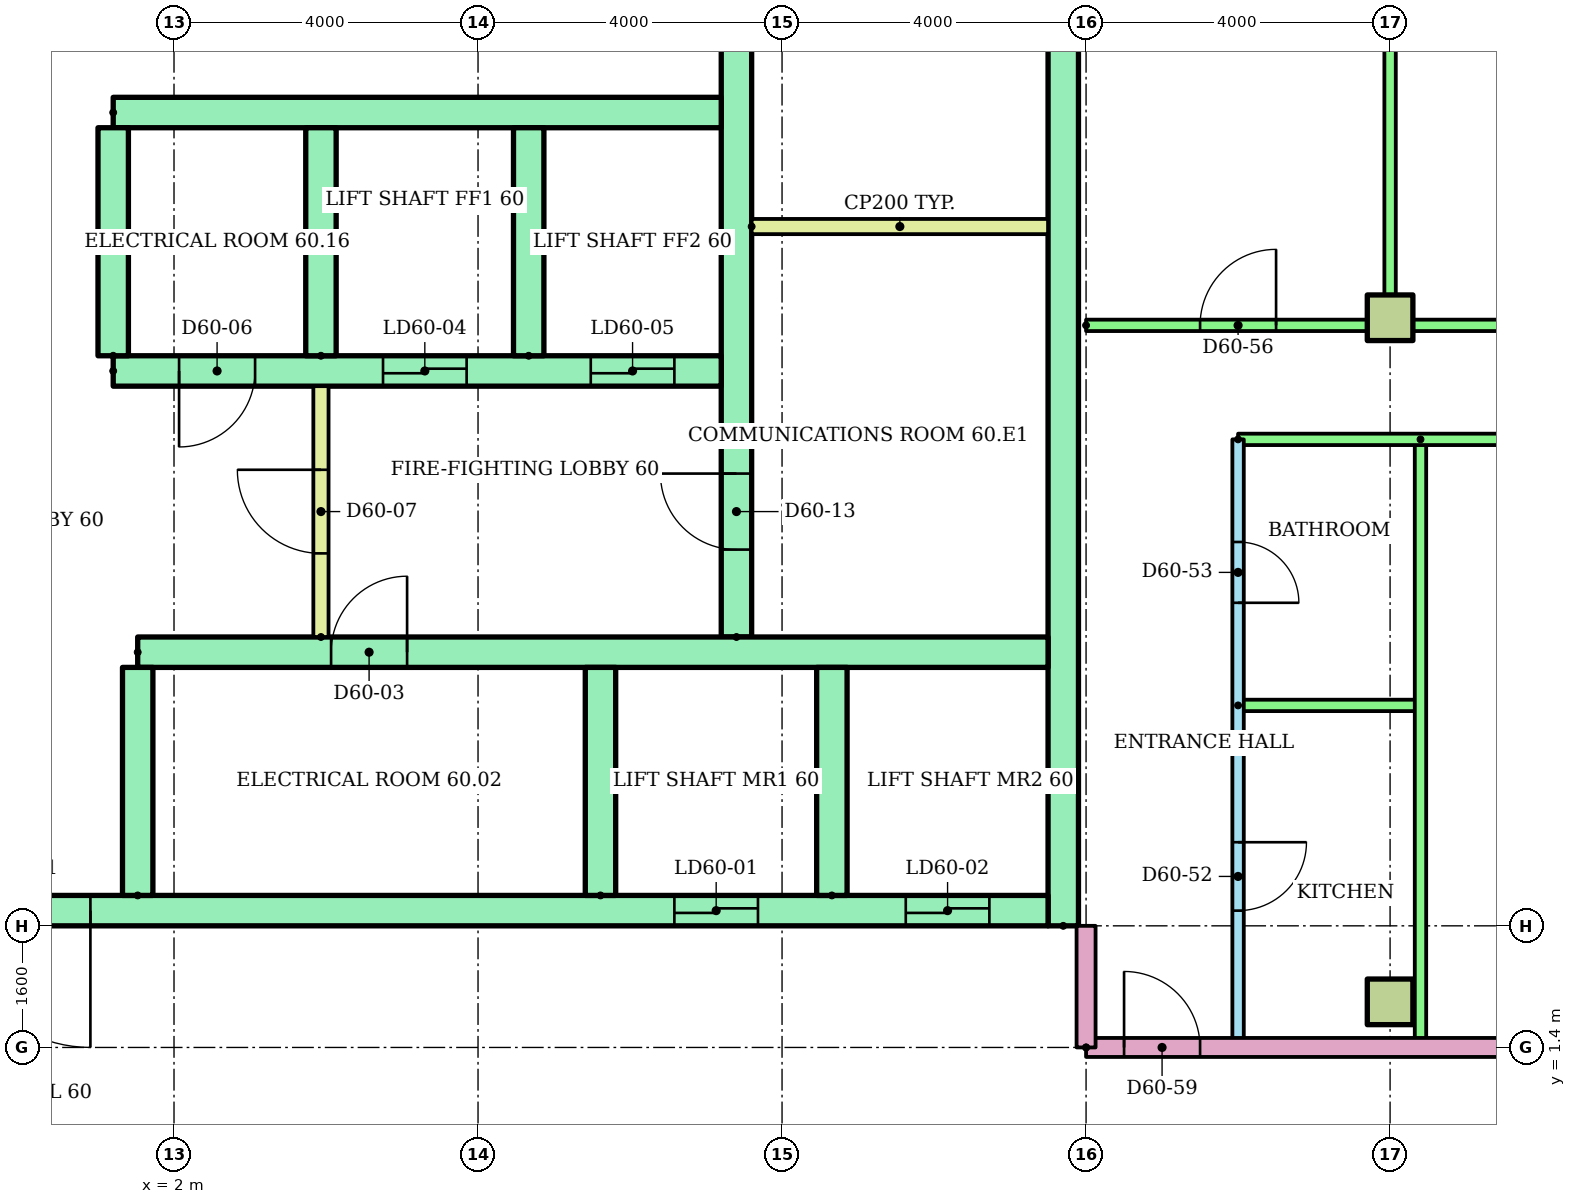
"""IFC4 building model, lengths in metres.
Left out: names, types, materials, properties, quantities, classifications, styles, units other than length and angle.
Written with IfcOpenShell. Run it as: python <this file> out.ifc"""

import sys

from ifc_helpers import new_model, si_unit, direction, frame, frame_2d, origin, origin_2d, place, context, subcontext, project, spatial, rectangle, extrude, element, fill, save


model = new_model("IFC4")
c1 = context("Model", 3, precision=1e-05, world=origin(), true_north=direction((0.0, 1.0)))
c2 = subcontext(c1, "Body", "Model", "MODEL_VIEW")
j1 = project(units=[si_unit("LENGTHUNIT", "METRE"), si_unit("PLANEANGLEUNIT", "RADIAN")], contexts=[c1])
p1 = place(None, origin())
s1 = spatial("IfcSite", under=j1, at=p1, CompositionType="ELEMENT")
p2 = place(p1, origin())
s2 = spatial("IfcBuilding", under=s1, at=p2, CompositionType="ELEMENT")
p3 = place(p2, frame((0.0, 0.0, 230.0)))
s3 = spatial("IfcBuildingStorey", under=s2, at=p3, CompositionType="ELEMENT", Elevation=230.0)
for number, where in (
    (1, (18.0, 2.0, 0.0)),
    (2, (18.0, 11.0, 0.0)),
):
    element("IfcColumn", number, at=place(p3, frame(where)), inside=s3, PredefinedType="COLUMN", context=c2, shape_type="SweptSolid", body=[
        extrude(rectangle(XDim=0.6, YDim=0.6, at=origin_2d()), origin(), (0.0, 0.0, 1.0), 3.2),
    ])
p4 = place(p3, frame((13.7, 3.0, 0.0), z_axis=(0.0, 0.0, 1.0), x_axis=(0.0, 1.0, 0.0)))
e3 = element("IfcWall", 3, at=p4, inside=s3, PredefinedType="SHEAR", context=c2, shape_type="SweptSolid", body=[
    extrude(rectangle(XDim=17.0, YDim=0.4, at=frame_2d((8.5, 0.0))), origin(), (0.0, 0.0, 1.0), 2.92),
])
p5 = place(p3, frame((9.4, 6.8, 0.0), z_axis=(0.0, 0.0, 1.0), x_axis=(0.0, 1.0, 0.0)))
e4 = element("IfcWall", 4, at=p5, inside=s3, PredefinedType="SHEAR", context=c2, shape_type="SweptSolid", body=[
    extrude(rectangle(XDim=12.7, YDim=0.4, at=frame_2d((6.35, 0.0))), origin(), (0.0, 0.0, 1.0), 2.92),
])
p6 = place(p5, frame((1.15, 0.0, 0.0)))
e5 = element("IfcOpeningElement", 5, at=p6, cuts=e4, PredefinedType="OPENING", context=c2, shape_type="SweptSolid", body=[
    extrude(rectangle(XDim=1.0, YDim=2.1, at=frame_2d((0.5, 1.05))), frame((0.0, 0.21, 0.0), z_axis=(0.0, -1.0, 0.0), x_axis=(1.0, 0.0, 0.0)), (0.0, 0.0, 1.0), 0.42),
])
p7 = place(p5, frame((7.925, 0.0, 0.0)))
e6 = element("IfcOpeningElement", 6, at=p7, cuts=e4, PredefinedType="OPENING", context=c2, shape_type="SweptSolid", body=[
    extrude(rectangle(XDim=1.0, YDim=2.1, at=frame_2d((0.5, 1.05))), frame((0.0, 0.21, 0.0), z_axis=(0.0, -1.0, 0.0), x_axis=(1.0, 0.0, 0.0)), (0.0, 0.0, 1.0), 0.42),
])
p8 = place(p3, frame((-13.5, 3.2, 0.0)))
e7 = element("IfcWall", 7, at=p8, inside=s3, PredefinedType="SHEAR", context=c2, shape_type="SweptSolid", body=[
    extrude(rectangle(XDim=27.0, YDim=0.4, at=frame_2d((13.5, 0.0))), origin(), (0.0, 0.0, 1.0), 2.92),
])
p9 = place(p8, frame((22.083, 0.0, 0.0)))
e8 = element("IfcOpeningElement", 8, at=p9, cuts=e7, PredefinedType="OPENING", context=c2, shape_type="SweptSolid", body=[
    extrude(rectangle(XDim=1.1, YDim=2.1, at=frame_2d((0.55, 1.05))), frame((0.0, 0.21, 0.0), z_axis=(0.0, -1.0, 0.0), x_axis=(1.0, 0.0, 0.0)), (0.0, 0.0, 1.0), 0.42),
])
p10 = place(p8, frame((25.128, 0.0, 0.0)))
e9 = element("IfcOpeningElement", 9, at=p10, cuts=e7, PredefinedType="OPENING", context=c2, shape_type="SweptSolid", body=[
    extrude(rectangle(XDim=1.1, YDim=2.1, at=frame_2d((0.55, 1.05))), frame((0.0, 0.21, 0.0), z_axis=(0.0, -1.0, 0.0), x_axis=(1.0, 0.0, 0.0)), (0.0, 0.0, 1.0), 0.42),
])
p11 = place(p8, frame((12.6, 0.0, 0.0)))
e10 = element("IfcOpeningElement", 10, at=p11, cuts=e7, PredefinedType="OPENING", context=c2, shape_type="SweptSolid", body=[
    extrude(rectangle(XDim=1.8, YDim=2.1, at=frame_2d((0.9, 1.05))), frame((0.0, 0.21, 0.0), z_axis=(0.0, -1.0, 0.0), x_axis=(1.0, 0.0, 0.0)), (0.0, 0.0, 1.0), 0.42),
])
p12 = place(p3, frame((1.522, 6.6, 0.0)))
e11 = element("IfcWall", 11, at=p12, inside=s3, PredefinedType="SHEAR", context=c2, shape_type="SweptSolid", body=[
    extrude(rectangle(XDim=11.978, YDim=0.4, at=frame_2d((5.989, 0.0))), origin(), (0.0, 0.0, 1.0), 2.92),
])
p13 = place(p12, frame((2.544, 0.0, 0.0)))
e12 = element("IfcOpeningElement", 12, at=p13, cuts=e11, PredefinedType="OPENING", context=c2, shape_type="SweptSolid", body=[
    extrude(rectangle(XDim=1.0, YDim=2.1, at=frame_2d((0.5, 1.05))), frame((0.0, 0.21, 0.0), z_axis=(0.0, -1.0, 0.0), x_axis=(1.0, 0.0, 0.0)), (0.0, 0.0, 1.0), 0.42),
])
for number, where, z_axis, x_axis in (
    (13, (1.522, 3.4, 0.0), (0.0, 0.0, 1.0), (0.0, 1.0, 0.0)),
    (14, (7.611, 3.4, 0.0), (0.0, 0.0, 1.0), (0.0, 1.0, 0.0)),
    (15, (10.656, 3.4, 0.0), (0.0, 0.0, 1.0), (0.0, 1.0, 0.0)),
):
    element("IfcWall", number, at=place(p3, frame(where, z_axis=z_axis, x_axis=x_axis)), inside=s3, PredefinedType="SHEAR", context=c2, shape_type="SweptSolid", body=[
        extrude(rectangle(XDim=3.0, YDim=0.4, at=frame_2d((1.5, 0.0))), origin(), (0.0, 0.0, 1.0), 2.92),
    ])
p14 = place(p3, frame((1.2, 10.3, 0.0)))
e16 = element("IfcWall", 16, at=p14, inside=s3, PredefinedType="SHEAR", context=c2, shape_type="SweptSolid", body=[
    extrude(rectangle(XDim=8.0, YDim=0.4, at=frame_2d((4.0, 0.0))), origin(), (0.0, 0.0, 1.0), 2.92),
])
p15 = place(p14, frame((3.55, 0.0, 0.0)))
e17 = element("IfcOpeningElement", 17, at=p15, cuts=e16, PredefinedType="OPENING", context=c2, shape_type="SweptSolid", body=[
    extrude(rectangle(XDim=1.1, YDim=2.1, at=frame_2d((0.55, 1.05))), frame((0.0, 0.21, 0.0), z_axis=(0.0, -1.0, 0.0), x_axis=(1.0, 0.0, 0.0)), (0.0, 0.0, 1.0), 0.42),
])
p16 = place(p14, frame((6.283, 0.0, 0.0)))
e18 = element("IfcOpeningElement", 18, at=p16, cuts=e16, PredefinedType="OPENING", context=c2, shape_type="SweptSolid", body=[
    extrude(rectangle(XDim=1.1, YDim=2.1, at=frame_2d((0.55, 1.05))), frame((0.0, 0.21, 0.0), z_axis=(0.0, -1.0, 0.0), x_axis=(1.0, 0.0, 0.0)), (0.0, 0.0, 1.0), 0.42),
])
p17 = place(p14, frame((0.867, 0.0, 0.0)))
e19 = element("IfcOpeningElement", 19, at=p17, cuts=e16, PredefinedType="OPENING", context=c2, shape_type="SweptSolid", body=[
    extrude(rectangle(XDim=1.0, YDim=2.1, at=frame_2d((0.5, 1.05))), frame((0.0, 0.21, 0.0), z_axis=(0.0, -1.0, 0.0), x_axis=(1.0, 0.0, 0.0)), (0.0, 0.0, 1.0), 0.42),
])
p18 = place(p3, frame((1.2, 13.7, 0.0)))
e20 = element("IfcWall", 20, at=p18, inside=s3, PredefinedType="SHEAR", context=c2, shape_type="SweptSolid", body=[
    extrude(rectangle(XDim=8.0, YDim=0.4, at=frame_2d((4.0, 0.0))), origin(), (0.0, 0.0, 1.0), 2.92),
])
for number, where, z_axis, x_axis in (
    (21, (1.2, 10.5, 0.0), (0.0, 0.0, 1.0), (0.0, 1.0, 0.0)),
    (22, (3.933, 10.5, 0.0), (0.0, 0.0, 1.0), (0.0, 1.0, 0.0)),
    (23, (6.667, 10.5, 0.0), (0.0, 0.0, 1.0), (0.0, 1.0, 0.0)),
):
    element("IfcWall", number, at=place(p3, frame(where, z_axis=z_axis, x_axis=x_axis)), inside=s3, PredefinedType="SHEAR", context=c2, shape_type="SweptSolid", body=[
        extrude(rectangle(XDim=3.0, YDim=0.4, at=frame_2d((1.5, 0.0))), origin(), (0.0, 0.0, 1.0), 2.92),
    ])
p19 = place(p3, frame((3.933, 6.8, 0.0), z_axis=(0.0, 0.0, 1.0), x_axis=(0.0, 1.0, 0.0)))
e24 = element("IfcWall", 24, at=p19, inside=s3, PredefinedType="PARTITIONING", context=c2, shape_type="SweptSolid", body=[
    extrude(rectangle(XDim=3.3, YDim=0.2, at=frame_2d((1.65, 0.0))), origin(), (0.0, 0.0, 1.0), 2.92),
])
p20 = place(p19, frame((1.1, 0.0, 0.0)))
e25 = element("IfcOpeningElement", 25, at=p20, cuts=e24, PredefinedType="OPENING", context=c2, shape_type="SweptSolid", body=[
    extrude(rectangle(XDim=1.1, YDim=2.1, at=frame_2d((0.55, 1.05))), frame((0.0, 0.11, 0.0), z_axis=(0.0, -1.0, 0.0), x_axis=(1.0, 0.0, 0.0)), (0.0, 0.0, 1.0), 0.22),
])
p21 = place(p3, frame((9.6, 12.2, 0.0)))
e26 = element("IfcWall", 26, at=p21, inside=s3, PredefinedType="PARTITIONING", context=c2, shape_type="SweptSolid", body=[
    extrude(rectangle(XDim=3.9, YDim=0.2, at=frame_2d((1.95, 0.0))), origin(), (0.0, 0.0, 1.0), 2.92),
])
p22 = place(p3, frame((16.0, 9.4, 0.0), z_axis=(0.0, 0.0, 1.0), x_axis=(0.0, -1.0, 0.0)))
e27 = element("IfcWall", 27, at=p22, inside=s3, PredefinedType="PARTITIONING", context=c2, shape_type="SweptSolid", body=[
    extrude(rectangle(XDim=8.0, YDim=0.15, at=frame_2d((4.0, 0.0))), origin(), (0.0, 0.0, 1.0), 2.4),
])
p23 = place(p22, frame((5.3, 0.0, 0.0)))
e28 = element("IfcOpeningElement", 28, at=p23, cuts=e27, PredefinedType="OPENING", context=c2, shape_type="SweptSolid", body=[
    extrude(rectangle(XDim=0.9, YDim=2.1, at=frame_2d((0.45, 1.05))), frame((0.0, 0.085, 0.0), z_axis=(0.0, -1.0, 0.0), x_axis=(1.0, 0.0, 0.0)), (0.0, 0.0, 1.0), 0.17),
])
p24 = place(p22, frame((1.35, 0.0, 0.0)))
e29 = element("IfcOpeningElement", 29, at=p24, cuts=e27, PredefinedType="OPENING", context=c2, shape_type="SweptSolid", body=[
    extrude(rectangle(XDim=0.8, YDim=2.1, at=frame_2d((0.4, 1.05))), frame((0.0, 0.085, 0.0), z_axis=(0.0, -1.0, 0.0), x_axis=(1.0, 0.0, 0.0)), (0.0, 0.0, 1.0), 0.17),
])
p25 = place(p3, frame((16.0, 5.9, 0.0)))
e30 = element("IfcWall", 30, at=p25, inside=s3, PredefinedType="PARTITIONING", context=c2, shape_type="SweptSolid", body=[
    extrude(rectangle(XDim=2.4, YDim=0.15, at=frame_2d((1.2, 0.0))), origin(), (0.0, 0.0, 1.0), 2.4),
])
p26 = place(p3, frame((18.4, 9.4, 0.0), z_axis=(0.0, 0.0, 1.0), x_axis=(0.0, -1.0, 0.0)))
e31 = element("IfcWall", 31, at=p26, inside=s3, PredefinedType="PARTITIONING", context=c2, shape_type="SweptSolid", body=[
    extrude(rectangle(XDim=8.0, YDim=0.15, at=frame_2d((4.0, 0.0))), origin(), (0.0, 0.0, 1.0), 2.4),
])
p27 = place(p3, frame((28.91, 9.4, 0.0), z_axis=(0.0, 0.0, 1.0), x_axis=(-1.0, 0.0, 0.0)))
e32 = element("IfcWall", 32, at=p27, inside=s3, PredefinedType="PARTITIONING", context=c2, shape_type="SweptSolid", body=[
    extrude(rectangle(XDim=12.91, YDim=0.15, at=frame_2d((6.455, 0.0))), origin(), (0.0, 0.0, 1.0), 2.4),
])
p28 = place(p27, frame((7.06, 0.0, 0.0)))
e33 = element("IfcOpeningElement", 33, at=p28, cuts=e32, PredefinedType="OPENING", context=c2, shape_type="SweptSolid", body=[
    extrude(rectangle(XDim=0.9, YDim=2.1, at=frame_2d((0.45, 1.05))), frame((0.0, 0.085, 0.0), z_axis=(0.0, -1.0, 0.0), x_axis=(1.0, 0.0, 0.0)), (0.0, 0.0, 1.0), 0.17),
])
p29 = place(p27, frame((1.534, 0.0, 0.0)))
e34 = element("IfcOpeningElement", 34, at=p29, cuts=e32, PredefinedType="OPENING", context=c2, shape_type="SweptSolid", body=[
    extrude(rectangle(XDim=0.9, YDim=2.1, at=frame_2d((0.45, 1.05))), frame((0.0, 0.085, 0.0), z_axis=(0.0, -1.0, 0.0), x_axis=(1.0, 0.0, 0.0)), (0.0, 0.0, 1.0), 0.17),
])
p30 = place(p3, frame((14.0, 10.9, 0.0)))
e35 = element("IfcWall", 35, at=p30, inside=s3, PredefinedType="PARTITIONING", context=c2, shape_type="SweptSolid", body=[
    extrude(rectangle(XDim=14.91, YDim=0.15, at=frame_2d((7.455, 0.0))), origin(), (0.0, 0.0, 1.0), 2.4),
])
p31 = place(p30, frame((1.5, 0.0, 0.0)))
e36 = element("IfcOpeningElement", 36, at=p31, cuts=e35, PredefinedType="OPENING", context=c2, shape_type="SweptSolid", body=[
    extrude(rectangle(XDim=1.0, YDim=2.1, at=frame_2d((0.5, 1.05))), frame((0.0, 0.085, 0.0), z_axis=(0.0, -1.0, 0.0), x_axis=(1.0, 0.0, 0.0)), (0.0, 0.0, 1.0), 0.17),
])
p32 = place(p30, frame((6.65, 0.0, 0.0)))
e37 = element("IfcOpeningElement", 37, at=p32, cuts=e35, PredefinedType="OPENING", context=c2, shape_type="SweptSolid", body=[
    extrude(rectangle(XDim=0.9, YDim=2.1, at=frame_2d((0.45, 1.05))), frame((0.0, 0.085, 0.0), z_axis=(0.0, -1.0, 0.0), x_axis=(1.0, 0.0, 0.0)), (0.0, 0.0, 1.0), 0.17),
])
p33 = place(p30, frame((12.476, 0.0, 0.0)))
e38 = element("IfcOpeningElement", 38, at=p33, cuts=e35, PredefinedType="OPENING", context=c2, shape_type="SweptSolid", body=[
    extrude(rectangle(XDim=0.9, YDim=2.1, at=frame_2d((0.45, 1.05))), frame((0.0, 0.085, 0.0), z_axis=(0.0, -1.0, 0.0), x_axis=(1.0, 0.0, 0.0)), (0.0, 0.0, 1.0), 0.17),
])
p34 = place(p3, frame((18.0, 18.921, 0.0), z_axis=(0.0, 0.0, 1.0), x_axis=(0.0, -1.0, 0.0)))
e39 = element("IfcWall", 39, at=p34, inside=s3, PredefinedType="PARTITIONING", context=c2, shape_type="SweptSolid", body=[
    extrude(rectangle(XDim=8.021, YDim=0.15, at=frame_2d((4.01, 0.0))), origin(), (0.0, 0.0, 1.0), 2.4),
])
p35 = place(p3, frame((14.0, 1.4, 0.0)))
e40 = element("IfcWall", 40, at=p35, inside=s3, PredefinedType="PARTITIONING", context=c2, shape_type="SweptSolid", body=[
    extrude(rectangle(XDim=14.92, YDim=0.25, at=frame_2d((7.46, 0.0))), origin(), (0.0, 0.0, 1.0), 2.4),
])
p36 = place(p35, frame((0.5, 0.0, 0.0)))
e41 = element("IfcOpeningElement", 41, at=p36, cuts=e40, PredefinedType="OPENING", context=c2, shape_type="SweptSolid", body=[
    extrude(rectangle(XDim=1.0, YDim=2.1, at=frame_2d((0.5, 1.05))), frame((0.0, 0.135, 0.0), z_axis=(0.0, -1.0, 0.0), x_axis=(1.0, 0.0, 0.0)), (0.0, 0.0, 1.0), 0.27),
])
p37 = place(p3, frame((14.0, 1.4, 0.0), z_axis=(0.0, 0.0, 1.0), x_axis=(0.0, 1.0, 0.0)))
e42 = element("IfcWall", 42, at=p37, inside=s3, PredefinedType="PARTITIONING", context=c2, shape_type="SweptSolid", body=[
    extrude(rectangle(XDim=1.6, YDim=0.25, at=frame_2d((0.8, 0.0))), origin(), (0.0, 0.0, 1.0), 2.4),
])
p38 = place(p9, origin())
e43 = element("IfcDoor", 43, at=p38, inside=s3, OperationType="SLIDING_TO_LEFT", PredefinedType="DOOR", context=c2, shape_type="SweptSolid", body=[
    extrude(rectangle(XDim=1.1, YDim=2.1, at=frame_2d((0.55, 1.05))), frame((0.0, 0.025, 0.0), z_axis=(0.0, -1.0, 0.0), x_axis=(1.0, 0.0, 0.0)), (0.0, 0.0, 1.0), 0.05),
])
fill(e8, e43)
p39 = place(p10, origin())
e44 = element("IfcDoor", 44, at=p39, inside=s3, OperationType="SLIDING_TO_LEFT", PredefinedType="DOOR", context=c2, shape_type="SweptSolid", body=[
    extrude(rectangle(XDim=1.1, YDim=2.1, at=frame_2d((0.55, 1.05))), frame((0.0, 0.025, 0.0), z_axis=(0.0, -1.0, 0.0), x_axis=(1.0, 0.0, 0.0)), (0.0, 0.0, 1.0), 0.05),
])
fill(e9, e44)
p40 = place(p11, frame((1.8, 0.0, 0.0), z_axis=(0.0, 0.0, 1.0), x_axis=(-1.0, 0.0, 0.0)))
e45 = element("IfcDoor", 45, at=p40, inside=s3, OperationType="DOUBLE_DOOR_SINGLE_SWING", PredefinedType="DOOR", context=c2, shape_type="SweptSolid", body=[
    extrude(rectangle(XDim=1.8, YDim=2.1, at=frame_2d((0.9, 1.05))), frame((0.0, 0.025, 0.0), z_axis=(0.0, -1.0, 0.0), x_axis=(1.0, 0.0, 0.0)), (0.0, 0.0, 1.0), 0.05),
])
fill(e10, e45)
p41 = place(p13, origin())
e46 = element("IfcDoor", 46, at=p41, inside=s3, OperationType="SINGLE_SWING_RIGHT", PredefinedType="DOOR", context=c2, shape_type="SweptSolid", body=[
    extrude(rectangle(XDim=1.0, YDim=2.1, at=frame_2d((0.5, 1.05))), frame((0.0, 0.025, 0.0), z_axis=(0.0, -1.0, 0.0), x_axis=(1.0, 0.0, 0.0)), (0.0, 0.0, 1.0), 0.05),
])
fill(e12, e46)
p42 = place(p15, origin())
e47 = element("IfcDoor", 47, at=p42, inside=s3, OperationType="SLIDING_TO_LEFT", PredefinedType="DOOR", context=c2, shape_type="SweptSolid", body=[
    extrude(rectangle(XDim=1.1, YDim=2.1, at=frame_2d((0.55, 1.05))), frame((0.0, 0.025, 0.0), z_axis=(0.0, -1.0, 0.0), x_axis=(1.0, 0.0, 0.0)), (0.0, 0.0, 1.0), 0.05),
])
fill(e17, e47)
p43 = place(p16, origin())
e48 = element("IfcDoor", 48, at=p43, inside=s3, OperationType="SLIDING_TO_LEFT", PredefinedType="DOOR", context=c2, shape_type="SweptSolid", body=[
    extrude(rectangle(XDim=1.1, YDim=2.1, at=frame_2d((0.55, 1.05))), frame((0.0, 0.025, 0.0), z_axis=(0.0, -1.0, 0.0), x_axis=(1.0, 0.0, 0.0)), (0.0, 0.0, 1.0), 0.05),
])
fill(e18, e48)
p44 = place(p17, frame((1.0, 0.0, 0.0), z_axis=(0.0, 0.0, 1.0), x_axis=(-1.0, 0.0, 0.0)))
e49 = element("IfcDoor", 49, at=p44, inside=s3, OperationType="SINGLE_SWING_LEFT", PredefinedType="DOOR", context=c2, shape_type="SweptSolid", body=[
    extrude(rectangle(XDim=1.0, YDim=2.1, at=frame_2d((0.5, 1.05))), frame((0.0, 0.025, 0.0), z_axis=(0.0, -1.0, 0.0), x_axis=(1.0, 0.0, 0.0)), (0.0, 0.0, 1.0), 0.05),
])
fill(e19, e49)
p45 = place(p20, origin())
e50 = element("IfcDoor", 50, at=p45, inside=s3, OperationType="SINGLE_SWING_RIGHT", PredefinedType="DOOR", context=c2, shape_type="SweptSolid", body=[
    extrude(rectangle(XDim=1.1, YDim=2.1, at=frame_2d((0.55, 1.05))), frame((0.0, 0.025, 0.0), z_axis=(0.0, -1.0, 0.0), x_axis=(1.0, 0.0, 0.0)), (0.0, 0.0, 1.0), 0.05),
])
fill(e25, e50)
p46 = place(p6, origin())
e51 = element("IfcDoor", 51, at=p46, inside=s3, OperationType="SINGLE_SWING_RIGHT", PredefinedType="DOOR", context=c2, shape_type="SweptSolid", body=[
    extrude(rectangle(XDim=1.0, YDim=2.1, at=frame_2d((0.5, 1.05))), frame((0.0, 0.025, 0.0), z_axis=(0.0, -1.0, 0.0), x_axis=(1.0, 0.0, 0.0)), (0.0, 0.0, 1.0), 0.05),
])
fill(e5, e51)
p47 = place(p23, origin())
e52 = element("IfcDoor", 52, at=p47, inside=s3, OperationType="SINGLE_SWING_LEFT", PredefinedType="DOOR", context=c2, shape_type="SweptSolid", body=[
    extrude(rectangle(XDim=0.9, YDim=2.1, at=frame_2d((0.45, 1.05))), frame((0.0, 0.025, 0.0), z_axis=(0.0, -1.0, 0.0), x_axis=(1.0, 0.0, 0.0)), (0.0, 0.0, 1.0), 0.05),
])
fill(e28, e52)
p48 = place(p24, origin())
e53 = element("IfcDoor", 53, at=p48, inside=s3, OperationType="SINGLE_SWING_RIGHT", PredefinedType="DOOR", context=c2, shape_type="SweptSolid", body=[
    extrude(rectangle(XDim=0.8, YDim=2.1, at=frame_2d((0.4, 1.05))), frame((0.0, 0.025, 0.0), z_axis=(0.0, -1.0, 0.0), x_axis=(1.0, 0.0, 0.0)), (0.0, 0.0, 1.0), 0.05),
])
fill(e29, e53)
p49 = place(p31, origin())
e54 = element("IfcDoor", 54, at=p49, inside=s3, OperationType="SINGLE_SWING_RIGHT", PredefinedType="DOOR", context=c2, shape_type="SweptSolid", body=[
    extrude(rectangle(XDim=1.0, YDim=2.1, at=frame_2d((0.5, 1.05))), frame((0.0, 0.025, 0.0), z_axis=(0.0, -1.0, 0.0), x_axis=(1.0, 0.0, 0.0)), (0.0, 0.0, 1.0), 0.05),
])
fill(e36, e54)
p50 = place(p36, origin())
e55 = element("IfcDoor", 55, at=p50, inside=s3, OperationType="SINGLE_SWING_LEFT", PredefinedType="DOOR", context=c2, shape_type="SweptSolid", body=[
    extrude(rectangle(XDim=1.0, YDim=2.1, at=frame_2d((0.5, 1.05))), frame((0.0, 0.025, 0.0), z_axis=(0.0, -1.0, 0.0), x_axis=(1.0, 0.0, 0.0)), (0.0, 0.0, 1.0), 0.05),
])
fill(e41, e55)
save(model, sys.argv[1])
